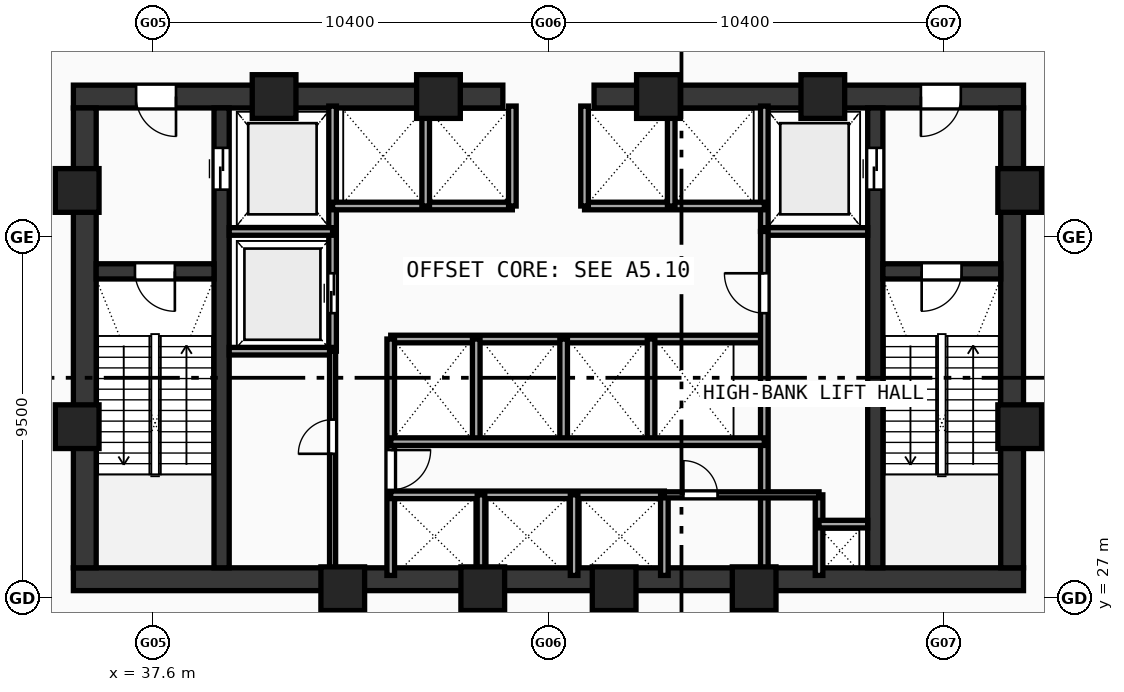
"""IFC4 building model, lengths in metres.
Left out: names, types, materials, properties, quantities, classifications, styles, units other than length and angle.
Written with IfcOpenShell. Run it as: python <this file> out.ifc"""

import sys

from ifc_helpers import new_model, si_unit, direction, frame, frame_2d, origin, origin_with_axes, origin_2d, place, context, subcontext, project, spatial, rectangle, hollow_rectangle, extrude, source, transform, mapped, element, fill, save


model = new_model("IFC4")
c1 = context("Model", 3, precision=1e-05, world=origin(), true_north=direction((0.0, 1.0)))
c2 = subcontext(c1, "Body", "Model", "MODEL_VIEW")
j1 = project(units=[si_unit("LENGTHUNIT", "METRE"), si_unit("PLANEANGLEUNIT", "RADIAN")], contexts=[c1])
p1 = place(None, origin())
s1 = spatial("IfcSite", under=j1, at=p1, CompositionType="ELEMENT")
p2 = place(p1, origin())
s2 = spatial("IfcBuilding", under=s1, at=p2, CompositionType="ELEMENT")
p3 = place(p2, frame((0.0, 0.0, 125.03)))
s3 = spatial("IfcBuildingStorey", under=s2, at=p3, CompositionType="ELEMENT", Elevation=125.03)
p4 = place(p3, frame((35.5, 27.5, 0.0), z_axis=(0.0, 0.0, 1.0), x_axis=(1.0, 0.0, 0.0)))
e1 = element("IfcWall", 1, at=p4, inside=s3, PredefinedType="SHEAR", context=c2, shape_type="SweptSolid", body=[
    extrude(rectangle(XDim=25.0, YDim=0.6, at=frame_2d((12.5, 0.0))), origin(), (0.0, 0.0, 1.0), 4.54),
])
p5 = place(p3, frame((35.5, 40.2, 0.0), z_axis=(0.0, 0.0, 1.0), x_axis=(1.0, 0.0, 0.0)))
e2 = element("IfcWall", 2, at=p5, inside=s3, PredefinedType="SHEAR", context=c2, shape_type="SweptSolid", body=[
    extrude(rectangle(XDim=11.3, YDim=0.6, at=frame_2d((5.65, 0.0))), origin(), (0.0, 0.0, 1.0), 4.54),
])
p6 = place(p5, frame((1.65, 0.0, 0.0)))
e3 = element("IfcOpeningElement", 3, at=p6, cuts=e2, PredefinedType="OPENING", context=c2, shape_type="SweptSolid", body=[
    extrude(rectangle(XDim=1.05, YDim=2.1, at=frame_2d((0.525, 1.05))), frame((0.0, 0.31, 0.0), z_axis=(0.0, -1.0, 0.0), x_axis=(1.0, 0.0, 0.0)), (0.0, 0.0, 1.0), 0.62),
])
p7 = place(p3, frame((49.2, 40.2, 0.0), z_axis=(0.0, 0.0, 1.0), x_axis=(1.0, 0.0, 0.0)))
e4 = element("IfcWall", 4, at=p7, inside=s3, PredefinedType="SHEAR", context=c2, shape_type="SweptSolid", body=[
    extrude(rectangle(XDim=11.3, YDim=0.6, at=frame_2d((5.65, 0.0))), origin(), (0.0, 0.0, 1.0), 4.54),
])
p8 = place(p7, frame((8.6, 0.0, 0.0)))
e5 = element("IfcOpeningElement", 5, at=p8, cuts=e4, PredefinedType="OPENING", context=c2, shape_type="SweptSolid", body=[
    extrude(rectangle(XDim=1.05, YDim=2.1, at=frame_2d((0.525, 1.05))), frame((0.0, 0.31, 0.0), z_axis=(0.0, -1.0, 0.0), x_axis=(1.0, 0.0, 0.0)), (0.0, 0.0, 1.0), 0.62),
])
for number, where, z_axis, x_axis in (
    (6, (35.8, 27.8, 0.0), (0.0, 0.0, 1.0), (0.0, 1.0, 0.0)),
    (7, (60.2, 27.8, 0.0), (0.0, 0.0, 1.0), (0.0, 1.0, 0.0)),
):
    element("IfcWall", number, at=place(p3, frame(where, z_axis=z_axis, x_axis=x_axis)), inside=s3, PredefinedType="SHEAR", context=c2, shape_type="SweptSolid", body=[
        extrude(rectangle(XDim=12.1, YDim=0.6, at=frame_2d((6.05, 0.0))), origin(), (0.0, 0.0, 1.0), 4.54),
    ])
p9 = place(p3, frame((39.4, 27.8, 0.0), z_axis=(0.0, 0.0, 1.0), x_axis=(0.0, 1.0, 0.0)))
e8 = element("IfcWall", 8, at=p9, inside=s3, PredefinedType="SHEAR", context=c2, shape_type="SweptSolid", body=[
    extrude(rectangle(XDim=12.1, YDim=0.4, at=frame_2d((6.05, 0.0))), origin(), (0.0, 0.0, 1.0), 4.54),
])
p10 = place(p9, frame((9.95, 0.0, 0.0)))
e9 = element("IfcOpeningElement", 9, at=p10, cuts=e8, PredefinedType="OPENING", context=c2, shape_type="SweptSolid", body=[
    extrude(rectangle(XDim=1.1, YDim=2.1, at=frame_2d((0.55, 1.05))), frame((0.0, 0.21, 0.0), z_axis=(0.0, -1.0, 0.0), x_axis=(1.0, 0.0, 0.0)), (0.0, 0.0, 1.0), 0.42),
])
p11 = place(p3, frame((56.6, 27.8, 0.0), z_axis=(0.0, 0.0, 1.0), x_axis=(0.0, 1.0, 0.0)))
e10 = element("IfcWall", 10, at=p11, inside=s3, PredefinedType="SHEAR", context=c2, shape_type="SweptSolid", body=[
    extrude(rectangle(XDim=12.1, YDim=0.4, at=frame_2d((6.05, 0.0))), origin(), (0.0, 0.0, 1.0), 4.54),
])
p12 = place(p11, frame((9.95, 0.0, 0.0)))
e11 = element("IfcOpeningElement", 11, at=p12, cuts=e10, PredefinedType="OPENING", context=c2, shape_type="SweptSolid", body=[
    extrude(rectangle(XDim=1.1, YDim=2.1, at=frame_2d((0.55, 1.05))), frame((0.0, 0.21, 0.0), z_axis=(0.0, -1.0, 0.0), x_axis=(1.0, 0.0, 0.0)), (0.0, 0.0, 1.0), 0.42),
])
p13 = place(p3, frame((36.1, 35.6, 0.0), z_axis=(0.0, 0.0, 1.0), x_axis=(1.0, 0.0, 0.0)))
e12 = element("IfcWall", 12, at=p13, inside=s3, PredefinedType="SHEAR", context=c2, shape_type="SweptSolid", body=[
    extrude(rectangle(XDim=3.1, YDim=0.4, at=frame_2d((1.55, 0.0))), origin(), (0.0, 0.0, 1.0), 4.54),
])
p14 = place(p13, frame((1.02, 0.0, 0.0)))
e13 = element("IfcOpeningElement", 13, at=p14, cuts=e12, PredefinedType="OPENING", context=c2, shape_type="SweptSolid", body=[
    extrude(rectangle(XDim=1.05, YDim=2.1, at=frame_2d((0.525, 1.05))), frame((0.0, 0.21, 0.0), z_axis=(0.0, -1.0, 0.0), x_axis=(1.0, 0.0, 0.0)), (0.0, 0.0, 1.0), 0.42),
])
p15 = place(p3, frame((56.8, 35.6, 0.0), z_axis=(0.0, 0.0, 1.0), x_axis=(1.0, 0.0, 0.0)))
e14 = element("IfcWall", 14, at=p15, inside=s3, PredefinedType="SHEAR", context=c2, shape_type="SweptSolid", body=[
    extrude(rectangle(XDim=3.1, YDim=0.4, at=frame_2d((1.55, 0.0))), origin(), (0.0, 0.0, 1.0), 4.54),
])
p16 = place(p15, frame((1.02, 0.0, 0.0)))
e15 = element("IfcOpeningElement", 15, at=p16, cuts=e14, PredefinedType="OPENING", context=c2, shape_type="SweptSolid", body=[
    extrude(rectangle(XDim=1.05, YDim=2.1, at=frame_2d((0.525, 1.05))), frame((0.0, 0.21, 0.0), z_axis=(0.0, -1.0, 0.0), x_axis=(1.0, 0.0, 0.0)), (0.0, 0.0, 1.0), 0.42),
])
m1 = source(origin(), c2, "Body", "SweptSolid", [
    extrude(hollow_rectangle(XDim=1.15, YDim=1.15, WallThickness=0.048, at=origin_2d()), origin(), (0.0, 0.0, 1.0), 4.82),
])
for number, where, z_axis, x_axis in (
    (16, (42.588, 27.25, -0.28), (0.0, 0.0, 1.0), (1.0, 0.0, 0.0)),
    (17, (46.272, 27.25, -0.28), (0.0, 0.0, 1.0), (1.0, 0.0, 0.0)),
    (18, (49.729, 27.25, -0.28), (0.0, 0.0, 1.0), (1.0, 0.0, 0.0)),
    (19, (53.412, 27.25, -0.28), (0.0, 0.0, 1.0), (1.0, 0.0, 0.0)),
    (20, (60.4, 31.513, -0.28), (0.0, 0.0, 1.0), (1.0, 0.0, 0.0)),
    (21, (60.4, 37.729, -0.28), (0.0, 0.0, 1.0), (1.0, 0.0, 0.0)),
    (22, (55.219, 40.2, -0.28), (0.0, 0.0, 1.0), (1.0, 0.0, 0.0)),
    (23, (50.894, 40.2, -0.28), (0.0, 0.0, 1.0), (1.0, 0.0, 0.0)),
    (24, (45.106, 40.2, -0.28), (0.0, 0.0, 1.0), (1.0, 0.0, 0.0)),
    (25, (40.781, 40.2, -0.28), (0.0, 0.0, 1.0), (1.0, 0.0, 0.0)),
    (26, (35.6, 37.729, -0.28), (0.0, 0.0, 1.0), (1.0, 0.0, 0.0)),
    (27, (35.6, 31.513, -0.28), (0.0, 0.0, 1.0), (1.0, 0.0, 0.0)),
):
    element("IfcColumn", number, at=place(p3, frame(where, z_axis=z_axis, x_axis=x_axis)), inside=s3, PredefinedType="COLUMN", context=c2, shape_type="MappedRepresentation", body=[
        mapped(m1, transform((0.0, 0.0, 0.0), scale=1.0)),
    ])
p17 = place(p3, frame((42.32, 33.5, 0.0), z_axis=(0.0, 0.0, 1.0), x_axis=(0.0, 1.0, 0.0)))
e28 = element("IfcWall", 28, at=p17, inside=s3, PredefinedType="SOLIDWALL", context=c2, shape_type="SweptSolid", body=[
    extrude(rectangle(XDim=6.45, YDim=0.2, at=frame_2d((3.225, 0.0))), origin(), (0.0, 0.0, 1.0), 4.54),
])
p18 = place(p17, frame((1.0, 0.0, 0.0)))
e29 = element("IfcOpeningElement", 29, at=p18, cuts=e28, PredefinedType="OPENING", context=c2, shape_type="SweptSolid", body=[
    extrude(rectangle(XDim=1.05, YDim=2.1, at=frame_2d((0.525, 1.05))), frame((0.0, 0.11, 0.0), z_axis=(0.0, -1.0, 0.0), x_axis=(1.0, 0.0, 0.0)), (0.0, 0.0, 1.0), 0.22),
])
for number, where, z_axis, x_axis in (
    (30, (39.6, 36.65, 0.0), (0.0, 0.0, 1.0), (1.0, 0.0, 0.0)),
    (31, (39.6, 33.5, 0.0), (0.0, 0.0, 1.0), (1.0, 0.0, 0.0)),
):
    element("IfcWall", number, at=place(p3, frame(where, z_axis=z_axis, x_axis=x_axis)), inside=s3, PredefinedType="SOLIDWALL", context=c2, shape_type="SweptSolid", body=[
        extrude(rectangle(XDim=2.72, YDim=0.2, at=frame_2d((1.36, 0.0))), origin(), (0.0, 0.0, 1.0), 4.54),
    ])
p19 = place(p3, frame((53.68, 36.65, 0.0), z_axis=(0.0, 0.0, 1.0), x_axis=(0.0, 1.0, 0.0)))
e32 = element("IfcWall", 32, at=p19, inside=s3, PredefinedType="SOLIDWALL", context=c2, shape_type="SweptSolid", body=[
    extrude(rectangle(XDim=3.3, YDim=0.2, at=frame_2d((1.65, 0.0))), origin(), (0.0, 0.0, 1.0), 4.54),
])
p20 = place(p3, frame((53.68, 36.65, 0.0), z_axis=(0.0, 0.0, 1.0), x_axis=(1.0, 0.0, 0.0)))
e33 = element("IfcWall", 33, at=p20, inside=s3, PredefinedType="SOLIDWALL", context=c2, shape_type="SweptSolid", body=[
    extrude(rectangle(XDim=2.72, YDim=0.2, at=frame_2d((1.36, 0.0))), origin(), (0.0, 0.0, 1.0), 4.54),
])
for number, where, z_axis, x_axis in (
    (34, (42.32, 37.32, 0.0), (0.0, 0.0, 1.0), (1.0, 0.0, 0.0)),
    (35, (48.95, 37.32, 0.0), (0.0, 0.0, 1.0), (1.0, 0.0, 0.0)),
):
    element("IfcWall", number, at=place(p3, frame(where, z_axis=z_axis, x_axis=x_axis)), inside=s3, PredefinedType="SOLIDWALL", context=c2, shape_type="SweptSolid", body=[
        extrude(rectangle(XDim=4.73, YDim=0.2, at=frame_2d((2.365, 0.0))), origin(), (0.0, 0.0, 1.0), 4.54),
    ])
for number, where, z_axis, x_axis in (
    (36, (47.05, 37.32, 0.0), (0.0, 0.0, 1.0), (0.0, 1.0, 0.0)),
    (37, (48.95, 37.32, 0.0), (0.0, 0.0, 1.0), (0.0, 1.0, 0.0)),
    (38, (44.77, 37.32, 0.0), (0.0, 0.0, 1.0), (0.0, 1.0, 0.0)),
    (39, (51.23, 37.32, 0.0), (0.0, 0.0, 1.0), (0.0, 1.0, 0.0)),
):
    element("IfcWall", number, at=place(p3, frame(where, z_axis=z_axis, x_axis=x_axis)), inside=s3, PredefinedType="SOLIDWALL", context=c2, shape_type="SweptSolid", body=[
        extrude(rectangle(XDim=2.63, YDim=0.2, at=frame_2d((1.315, 0.0))), origin(), (0.0, 0.0, 1.0), 4.54),
    ])
p21 = place(p3, frame((43.85, 33.82, 0.0), z_axis=(0.0, 0.0, 1.0), x_axis=(1.0, 0.0, 0.0)))
e40 = element("IfcWall", 40, at=p21, inside=s3, PredefinedType="SOLIDWALL", context=c2, shape_type="SweptSolid", body=[
    extrude(rectangle(XDim=9.83, YDim=0.2, at=frame_2d((4.915, 0.0))), origin(), (0.0, 0.0, 1.0), 4.54),
])
p22 = place(p3, frame((43.85, 27.6, 0.0), z_axis=(0.0, 0.0, 1.0), x_axis=(0.0, 1.0, 0.0)))
e41 = element("IfcWall", 41, at=p22, inside=s3, PredefinedType="SOLIDWALL", context=c2, shape_type="SweptSolid", body=[
    extrude(rectangle(XDim=6.22, YDim=0.2, at=frame_2d((3.11, 0.0))), origin(), (0.0, 0.0, 1.0), 4.54),
])
p23 = place(p22, frame((2.25, 0.0, 0.0)))
e42 = element("IfcOpeningElement", 42, at=p23, cuts=e41, PredefinedType="OPENING", context=c2, shape_type="SweptSolid", body=[
    extrude(rectangle(XDim=1.05, YDim=2.1, at=frame_2d((0.525, 1.05))), frame((0.0, 0.11, 0.0), z_axis=(0.0, -1.0, 0.0), x_axis=(1.0, 0.0, 0.0)), (0.0, 0.0, 1.0), 0.22),
])
p24 = place(p3, frame((53.68, 27.6, 0.0), z_axis=(0.0, 0.0, 1.0), x_axis=(0.0, 1.0, 0.0)))
e43 = element("IfcWall", 43, at=p24, inside=s3, PredefinedType="SOLIDWALL", context=c2, shape_type="SweptSolid", body=[
    extrude(rectangle(XDim=9.05, YDim=0.2, at=frame_2d((4.525, 0.0))), origin(), (0.0, 0.0, 1.0), 4.54),
])
p25 = place(p24, frame((6.9, 0.0, 0.0)))
e44 = element("IfcOpeningElement", 44, at=p25, cuts=e43, PredefinedType="OPENING", context=c2, shape_type="SweptSolid", body=[
    extrude(rectangle(XDim=1.05, YDim=2.1, at=frame_2d((0.525, 1.05))), frame((0.0, 0.11, 0.0), z_axis=(0.0, -1.0, 0.0), x_axis=(1.0, 0.0, 0.0)), (0.0, 0.0, 1.0), 0.22),
])
for number, where, z_axis, x_axis in (
    (45, (46.1, 31.12, 0.0), (0.0, 0.0, 1.0), (0.0, 1.0, 0.0)),
    (46, (48.4, 31.12, 0.0), (0.0, 0.0, 1.0), (0.0, 1.0, 0.0)),
    (47, (50.7, 31.12, 0.0), (0.0, 0.0, 1.0), (0.0, 1.0, 0.0)),
):
    element("IfcWall", number, at=place(p3, frame(where, z_axis=z_axis, x_axis=x_axis)), inside=s3, PredefinedType="SOLIDWALL", context=c2, shape_type="SweptSolid", body=[
        extrude(rectangle(XDim=2.7, YDim=0.2, at=frame_2d((1.35, 0.0))), origin(), (0.0, 0.0, 1.0), 4.54),
    ])
p26 = place(p3, frame((43.85, 29.72, 0.0), z_axis=(0.0, 0.0, 1.0), x_axis=(1.0, 0.0, 0.0)))
e48 = element("IfcWall", 48, at=p26, inside=s3, PredefinedType="SOLIDWALL", context=c2, shape_type="SweptSolid", body=[
    extrude(rectangle(XDim=7.2, YDim=0.2, at=frame_2d((3.6, 0.0))), origin(), (0.0, 0.0, 1.0), 4.54),
])
p27 = place(p3, frame((51.05, 27.6, 0.0), z_axis=(0.0, 0.0, 1.0), x_axis=(0.0, 1.0, 0.0)))
e49 = element("IfcWall", 49, at=p27, inside=s3, PredefinedType="SOLIDWALL", context=c2, shape_type="SweptSolid", body=[
    extrude(rectangle(XDim=2.12, YDim=0.2, at=frame_2d((1.06, 0.0))), origin(), (0.0, 0.0, 1.0), 4.54),
])
p28 = place(p3, frame((43.85, 31.12, 0.0), z_axis=(0.0, 0.0, 1.0), x_axis=(1.0, 0.0, 0.0)))
e50 = element("IfcWall", 50, at=p28, inside=s3, PredefinedType="SOLIDWALL", context=c2, shape_type="SweptSolid", body=[
    extrude(rectangle(XDim=9.83, YDim=0.2, at=frame_2d((4.915, 0.0))), origin(), (0.0, 0.0, 1.0), 4.54),
])
for number, where, z_axis, x_axis in (
    (51, (46.225, 27.6, 0.0), (0.0, 0.0, 1.0), (0.0, 1.0, 0.0)),
    (52, (48.675, 27.6, 0.0), (0.0, 0.0, 1.0), (0.0, 1.0, 0.0)),
    (53, (55.12, 27.6, 0.0), (0.0, 0.0, 1.0), (0.0, 1.0, 0.0)),
):
    element("IfcWall", number, at=place(p3, frame(where, z_axis=z_axis, x_axis=x_axis)), inside=s3, PredefinedType="SOLIDWALL", context=c2, shape_type="SweptSolid", body=[
        extrude(rectangle(XDim=2.12, YDim=0.2, at=frame_2d((1.06, 0.0))), origin(), (0.0, 0.0, 1.0), 4.54),
    ])
p29 = place(p3, frame((55.12, 28.95, 0.0), z_axis=(0.0, 0.0, 1.0), x_axis=(1.0, 0.0, 0.0)))
e54 = element("IfcWall", 54, at=p29, inside=s3, PredefinedType="SOLIDWALL", context=c2, shape_type="SweptSolid", body=[
    extrude(rectangle(XDim=1.28, YDim=0.2, at=frame_2d((0.64, 0.0))), origin(), (0.0, 0.0, 1.0), 4.54),
])
p30 = place(p3, frame((42.32, 27.6, 0.0), z_axis=(0.0, 0.0, 1.0), x_axis=(0.0, 1.0, 0.0)))
e55 = element("IfcWall", 55, at=p30, inside=s3, PredefinedType="PARTITIONING", context=c2, shape_type="SweptSolid", body=[
    extrude(rectangle(XDim=5.9, YDim=0.16, at=frame_2d((2.95, 0.0))), origin(), (0.0, 0.0, 1.0), 4.54),
])
p31 = place(p30, frame((3.2, 0.0, 0.0)))
e56 = element("IfcOpeningElement", 56, at=p31, cuts=e55, PredefinedType="OPENING", context=c2, shape_type="SweptSolid", body=[
    extrude(rectangle(XDim=0.9, YDim=2.1, at=frame_2d((0.45, 1.05))), frame((0.0, 0.09, 0.0), z_axis=(0.0, -1.0, 0.0), x_axis=(1.0, 0.0, 0.0)), (0.0, 0.0, 1.0), 0.18),
])
p32 = place(p3, frame((51.05, 29.72, 0.0), z_axis=(0.0, 0.0, 1.0), x_axis=(1.0, 0.0, 0.0)))
e57 = element("IfcWall", 57, at=p32, inside=s3, PredefinedType="PARTITIONING", context=c2, shape_type="SweptSolid", body=[
    extrude(rectangle(XDim=4.07, YDim=0.16, at=frame_2d((2.035, 0.0))), origin(), (0.0, 0.0, 1.0), 4.54),
])
p33 = place(p32, frame((0.5, 0.0, 0.0)))
e58 = element("IfcOpeningElement", 58, at=p33, cuts=e57, PredefinedType="OPENING", context=c2, shape_type="SweptSolid", body=[
    extrude(rectangle(XDim=0.9, YDim=2.1, at=frame_2d((0.45, 1.05))), frame((0.0, 0.09, 0.0), z_axis=(0.0, -1.0, 0.0), x_axis=(1.0, 0.0, 0.0)), (0.0, 0.0, 1.0), 0.18),
])
m2 = source(origin(), c2, "Body", "SweptSolid", [
    extrude(rectangle(XDim=1.05, YDim=2.1, at=frame_2d((0.525, 1.05))), frame((0.0, 0.025, 0.0), z_axis=(0.0, -1.0, 0.0), x_axis=(1.0, 0.0, 0.0)), (0.0, 0.0, 1.0), 0.05),
])
p34 = place(p14, frame((1.05, 0.0, 0.0), z_axis=(0.0, 0.0, 1.0), x_axis=(-1.0, 0.0, 0.0)))
e59 = element("IfcDoor", 59, at=p34, inside=s3, OperationType="SINGLE_SWING_LEFT", PredefinedType="DOOR", context=c2, shape_type="MappedRepresentation", body=[
    mapped(m2, transform((0.0, 0.0, 0.0), scale=1.0)),
])
fill(e13, e59)
p35 = place(p16, frame((1.05, 0.0, 0.0), z_axis=(0.0, 0.0, 1.0), x_axis=(-1.0, 0.0, 0.0)))
e60 = element("IfcDoor", 60, at=p35, inside=s3, OperationType="SINGLE_SWING_RIGHT", PredefinedType="DOOR", context=c2, shape_type="MappedRepresentation", body=[
    mapped(m2, transform((0.0, 0.0, 0.0), scale=1.0)),
])
fill(e15, e60)
p36 = place(p6, frame((1.05, 0.0, 0.0), z_axis=(0.0, 0.0, 1.0), x_axis=(-1.0, 0.0, 0.0)))
e61 = element("IfcDoor", 61, at=p36, inside=s3, OperationType="SINGLE_SWING_LEFT", PredefinedType="DOOR", context=c2, shape_type="MappedRepresentation", body=[
    mapped(m2, transform((0.0, 0.0, 0.0), scale=1.0)),
])
fill(e3, e61)
p37 = place(p8, frame((1.05, 0.0, 0.0), z_axis=(0.0, 0.0, 1.0), x_axis=(-1.0, 0.0, 0.0)))
e62 = element("IfcDoor", 62, at=p37, inside=s3, OperationType="SINGLE_SWING_RIGHT", PredefinedType="DOOR", context=c2, shape_type="MappedRepresentation", body=[
    mapped(m2, transform((0.0, 0.0, 0.0), scale=1.0)),
])
fill(e5, e62)
m3 = source(origin(), c2, "Body", "SweptSolid", [
    extrude(rectangle(XDim=1.1, YDim=2.1, at=frame_2d((0.55, 1.05))), frame((0.0, 0.025, 0.0), z_axis=(0.0, -1.0, 0.0), x_axis=(1.0, 0.0, 0.0)), (0.0, 0.0, 1.0), 0.05),
])
p38 = place(p10, frame((1.1, 0.0, 0.0), z_axis=(0.0, 0.0, 1.0), x_axis=(-1.0, 0.0, 0.0)))
e63 = element("IfcDoor", 63, at=p38, inside=s3, OperationType="DOUBLE_DOOR_SLIDING", PredefinedType="DOOR", context=c2, shape_type="MappedRepresentation", body=[
    mapped(m3, transform((0.0, 0.0, 0.0), scale=1.0)),
])
fill(e9, e63)
p39 = place(p12, origin_with_axes())
e64 = element("IfcDoor", 64, at=p39, inside=s3, OperationType="DOUBLE_DOOR_SLIDING", PredefinedType="DOOR", context=c2, shape_type="MappedRepresentation", body=[
    mapped(m3, transform((0.0, 0.0, 0.0), scale=1.0)),
])
fill(e11, e64)
p40 = place(p18, origin_with_axes())
e65 = element("IfcDoor", 65, at=p40, inside=s3, OperationType="DOUBLE_DOOR_SLIDING", PredefinedType="DOOR", context=c2, shape_type="MappedRepresentation", body=[
    mapped(m2, transform((0.0, 0.0, 0.0), scale=1.0)),
])
fill(e29, e65)
p41 = place(p23, frame((1.05, 0.0, 0.0), z_axis=(0.0, 0.0, 1.0), x_axis=(-1.0, 0.0, 0.0)))
e66 = element("IfcDoor", 66, at=p41, inside=s3, OperationType="SINGLE_SWING_LEFT", PredefinedType="DOOR", context=c2, shape_type="MappedRepresentation", body=[
    mapped(m2, transform((0.0, 0.0, 0.0), scale=1.0)),
])
fill(e42, e66)
p42 = place(p25, origin_with_axes())
e67 = element("IfcDoor", 67, at=p42, inside=s3, OperationType="SINGLE_SWING_RIGHT", PredefinedType="DOOR", context=c2, shape_type="MappedRepresentation", body=[
    mapped(m2, transform((0.0, 0.0, 0.0), scale=1.0)),
])
fill(e44, e67)
m4 = source(origin(), c2, "Body", "SweptSolid", [
    extrude(rectangle(XDim=0.9, YDim=2.1, at=frame_2d((0.45, 1.05))), frame((0.0, 0.025, 0.0), z_axis=(0.0, -1.0, 0.0), x_axis=(1.0, 0.0, 0.0)), (0.0, 0.0, 1.0), 0.05),
])
p43 = place(p31, origin_with_axes())
e68 = element("IfcDoor", 68, at=p43, inside=s3, OperationType="SINGLE_SWING_LEFT", PredefinedType="DOOR", context=c2, shape_type="MappedRepresentation", body=[
    mapped(m4, transform((0.0, 0.0, 0.0), scale=1.0)),
])
fill(e56, e68)
p44 = place(p33, origin_with_axes())
e69 = element("IfcDoor", 69, at=p44, inside=s3, OperationType="SINGLE_SWING_LEFT", PredefinedType="DOOR", context=c2, shape_type="MappedRepresentation", body=[
    mapped(m4, transform((0.0, 0.0, 0.0), scale=1.0)),
])
fill(e58, e69)
save(model, sys.argv[1])
